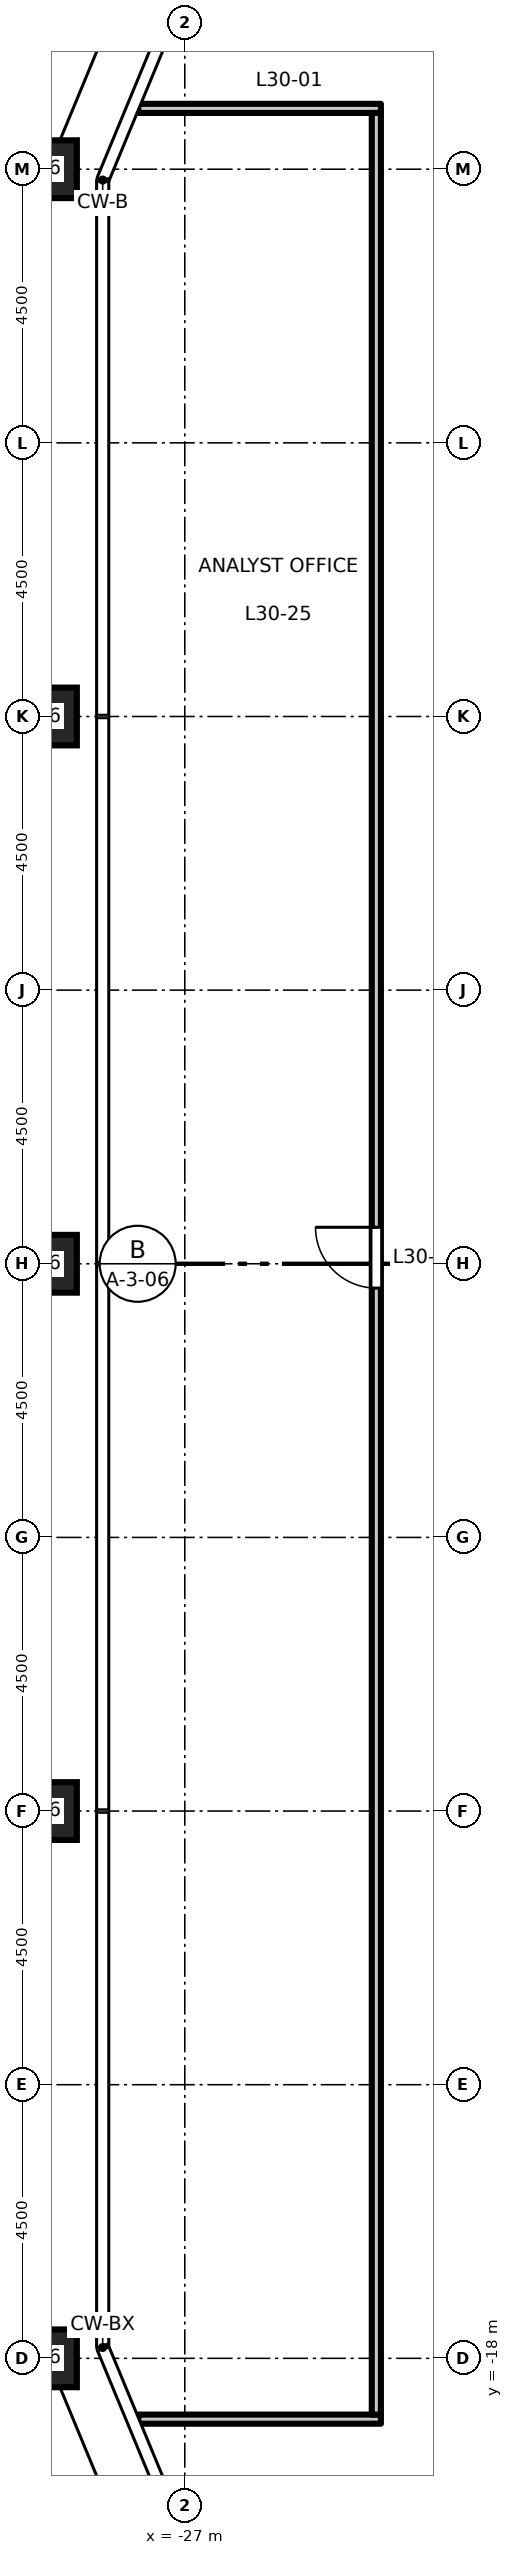
"""IFC4 building model, lengths in metres.
Left out: names, types, materials, properties, quantities, classifications, styles, units other than length and angle.
Written with IfcOpenShell. Run it as: python <this file> out.ifc"""

import sys

from ifc_helpers import new_model, si_unit, direction, frame, frame_2d, origin, origin_2d, place, context, subcontext, project, spatial, rectangle, hollow_rectangle, extrude, element, fill, save


model = new_model("IFC4")
c1 = context("Model", 3, precision=1e-05, world=origin(), true_north=direction((0.0, 1.0)))
c2 = subcontext(c1, "Body", "Model", "MODEL_VIEW")
j1 = project(units=[si_unit("LENGTHUNIT", "METRE"), si_unit("PLANEANGLEUNIT", "RADIAN")], contexts=[c1])
p1 = place(None, origin())
s1 = spatial("IfcSite", under=j1, at=p1, CompositionType="ELEMENT")
p2 = place(p1, origin())
s2 = spatial("IfcBuilding", under=s1, at=p2, CompositionType="ELEMENT")
p3 = place(p2, frame((0.0, 0.0, 140.7)))
s3 = spatial("IfcBuildingStorey", under=s2, at=p3, CompositionType="ELEMENT", Elevation=140.7)
for number, where, z_axis, x_axis in (
    (1, (-29.25, 18.0, 0.0), (0.0, 0.0, 1.0), (1.0, 0.0, 0.0)),
    (2, (-29.25, 9.0, 0.0), (0.0, 0.0, 1.0), (1.0, 0.0, 0.0)),
    (3, (-29.25, 0.0, 0.0), (0.0, 0.0, 1.0), (1.0, 0.0, 0.0)),
    (4, (-29.25, -9.0, 0.0), (0.0, 0.0, 1.0), (1.0, 0.0, 0.0)),
    (5, (-29.25, -18.0, 0.0), (0.0, 0.0, 1.0), (1.0, 0.0, 0.0)),
):
    element("IfcColumn", number, at=place(p3, frame(where, z_axis=z_axis, x_axis=x_axis)), inside=s3, PredefinedType="COLUMN", context=c2, shape_type="SweptSolid", body=[
        extrude(hollow_rectangle(XDim=0.95, YDim=0.95, WallThickness=0.055, at=origin_2d()), origin(), (0.0, 0.0, 1.0), 4.5),
    ])
for number, where, z_axis, x_axis in (
    (6, (-27.764, -19.0, 0.0), (0.0, 0.0, 1.0), (1.0, 0.0, 0.0)),
    (7, (-27.764, 19.0, 0.0), (0.0, 0.0, 1.0), (1.0, 0.0, 0.0)),
):
    element("IfcWall", number, at=place(p3, frame(where, z_axis=z_axis, x_axis=x_axis)), inside=s3, PredefinedType="PARTITIONING", context=c2, shape_type="SweptSolid", body=[
        extrude(rectangle(XDim=3.989, YDim=0.15, at=frame_2d((1.995, 0.0))), origin(), (0.0, 0.0, 1.0), 4.35),
    ])
p4 = place(p3, frame((-23.85, -18.925, 0.0), z_axis=(0.0, 0.0, 1.0), x_axis=(0.0, 1.0, 0.0)))
e8 = element("IfcWall", 8, at=p4, inside=s3, PredefinedType="PARTITIONING", context=c2, shape_type="SweptSolid", body=[
    extrude(rectangle(XDim=37.85, YDim=0.15, at=frame_2d((18.925, 0.0))), origin(), (0.0, 0.0, 1.0), 4.35),
])
p5 = place(p4, frame((18.525, 0.0, 0.0)))
e9 = element("IfcOpeningElement", 9, at=p5, cuts=e8, PredefinedType="OPENING", context=c2, shape_type="SweptSolid", body=[
    extrude(rectangle(XDim=1.0, YDim=2.1, at=frame_2d((0.5, 1.05))), frame((0.0, 0.085, 0.0), z_axis=(0.0, -1.0, 0.0), x_axis=(1.0, 0.0, 0.0)), (0.0, 0.0, 1.0), 0.17),
])
p6 = place(p5, origin())
e10 = element("IfcDoor", 10, at=p6, inside=s3, OperationType="SINGLE_SWING_RIGHT", PredefinedType="DOOR", context=c2, shape_type="SweptSolid", body=[
    extrude(rectangle(XDim=1.0, YDim=2.1, at=frame_2d((0.5, 1.05))), frame((0.0, 0.025, 0.0), z_axis=(0.0, -1.0, 0.0), x_axis=(1.0, 0.0, 0.0)), (0.0, 0.0, 1.0), 0.05),
])
fill(e9, e10)
save(model, sys.argv[1])
